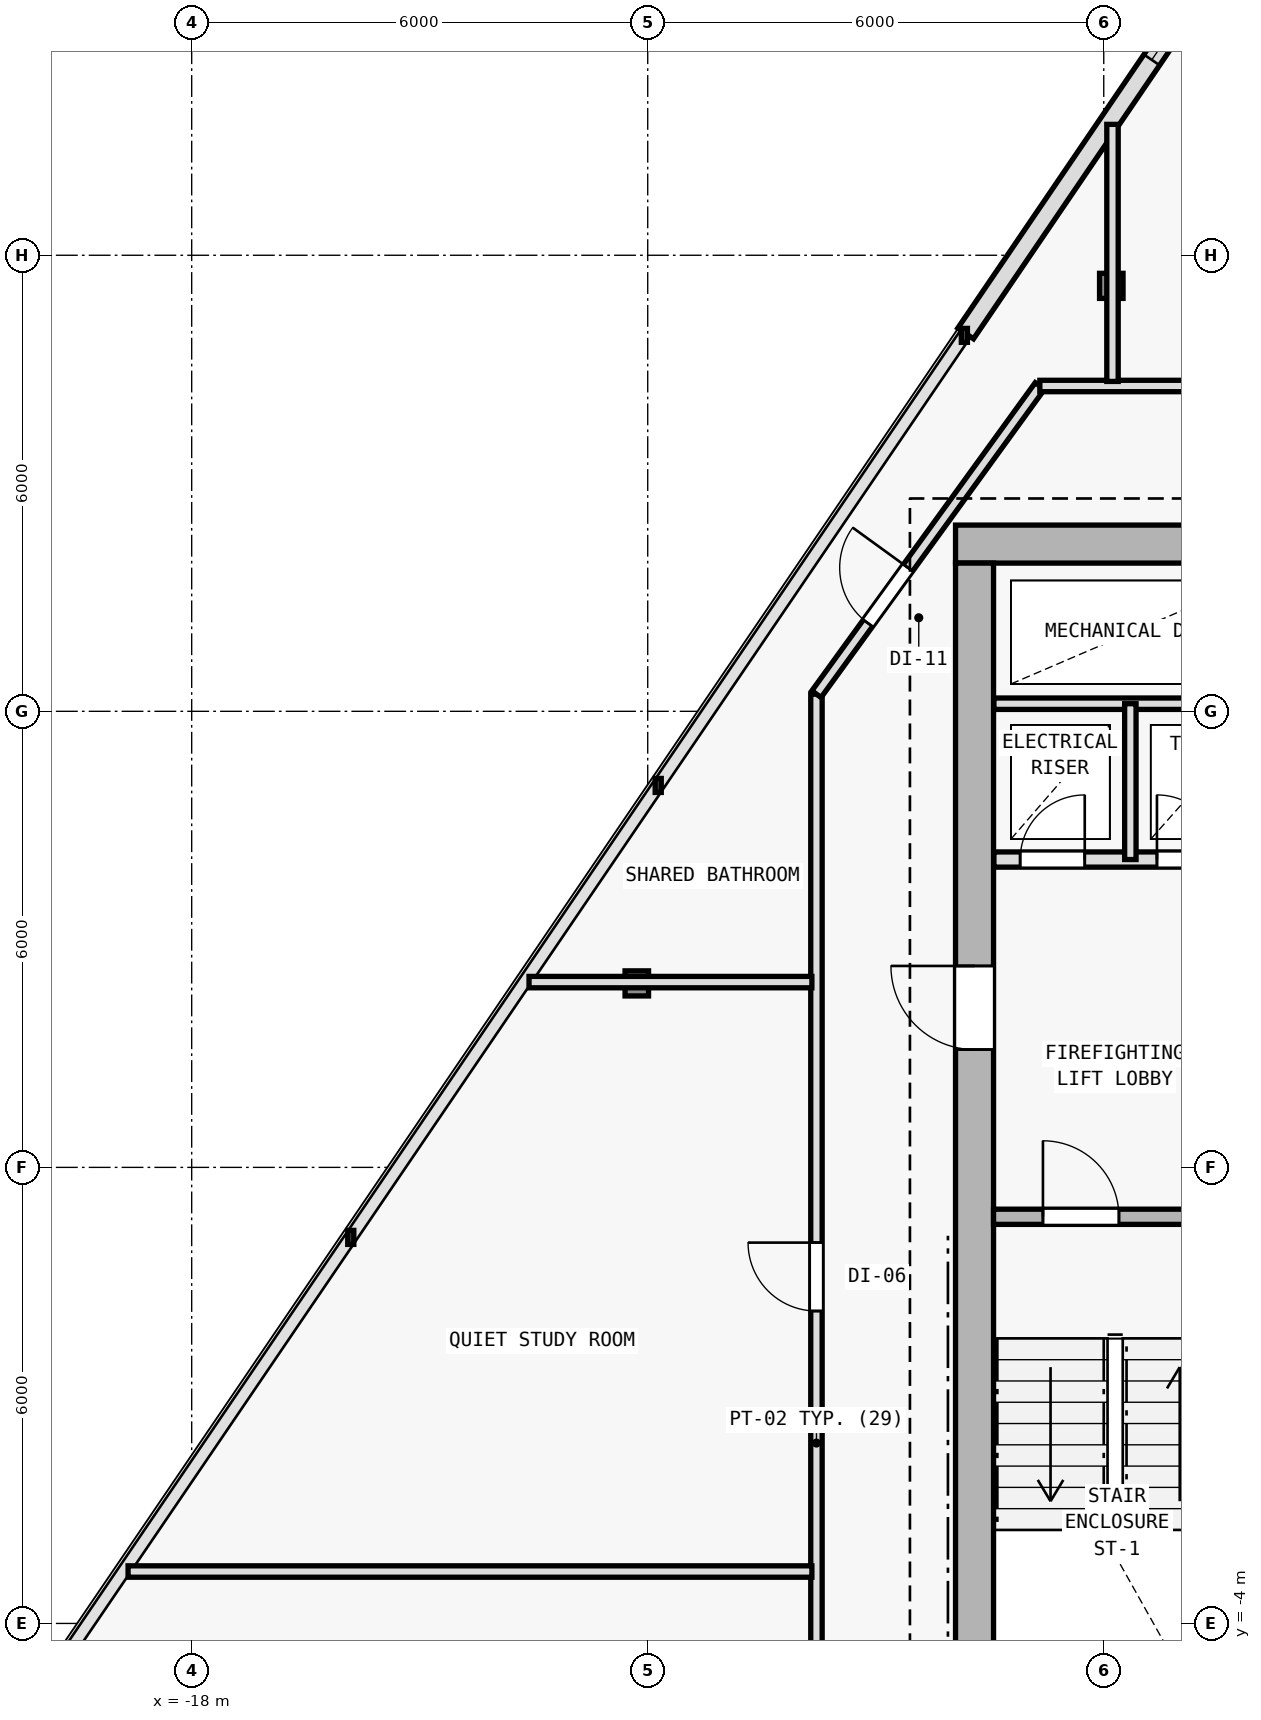
"""IFC4 building model, lengths in metres.
Left out: names, types, materials, properties, quantities, classifications, styles, units other than length and angle.
Written with IfcOpenShell. Run it as: python <this file> out.ifc"""

import sys

from ifc_helpers import new_model, si_unit, direction, frame, frame_2d, origin, origin_2d, place, context, subcontext, project, spatial, rectangle, i_section, extrude, element, fill, save


model = new_model("IFC4")
c1 = context("Model", 3, precision=1e-05, world=origin(), true_north=direction((0.0, 1.0)))
c2 = subcontext(c1, "Body", "Model", "MODEL_VIEW")
j1 = project(units=[si_unit("LENGTHUNIT", "METRE"), si_unit("PLANEANGLEUNIT", "RADIAN")], contexts=[c1])
p1 = place(None, origin())
s1 = spatial("IfcSite", under=j1, at=p1, CompositionType="ELEMENT")
p2 = place(p1, origin())
s2 = spatial("IfcBuilding", under=s1, at=p2, CompositionType="ELEMENT")
p3 = place(p2, frame((0.0, 0.0, 272.4)))
s3 = spatial("IfcBuildingStorey", under=s2, at=p3, CompositionType="ELEMENT", Elevation=272.4)
for number, where, z_axis, x_axis in (
    (1, (-7.7, 10.2, 0.0), (0.0, 0.0, 1.0), (1.0, 0.0, 0.0)),
    (2, (-7.7, 2.0, 0.0), (0.0, 0.0, 1.0), (1.0, 0.0, 0.0)),
):
    element("IfcColumn", number, at=place(p3, frame(where, z_axis=z_axis, x_axis=x_axis)), inside=s3, PredefinedType="COLUMN", context=c2, shape_type="SweptSolid", body=[
        extrude(i_section(OverallWidth=0.374, OverallDepth=0.372, WebThickness=0.012, FlangeThickness=0.02, FilletRadius=0.015, at=origin_2d()), origin(), (0.0, 0.0, 1.0), 3.6),
    ])
p4 = place(p3, frame((-5.901, 13.597, 0.006), z_axis=(0.008775143007, -0.002584925847, 0.999958156636), x_axis=(0.282568886397, 0.959247009086, 0.0)))
e3 = element("IfcColumn", 3, at=p4, inside=s3, PredefinedType="COLUMN", context=c2, shape_type="SweptSolid", body=[
    extrude(i_section(OverallWidth=0.309, OverallDepth=0.33, WebThickness=0.011, FlangeThickness=0.019, FilletRadius=0.027, at=origin_2d()), origin(), (0.0, 0.0, 1.0), 3.589),
])
p5 = place(p3, frame((-12.144, 4.42, 0.006), z_axis=(0.017003572908, 0.009522000828, 0.999810086971), x_axis=(-0.488603368932, 0.87250601595, 0.0)))
e4 = element("IfcColumn", 4, at=p5, inside=s3, PredefinedType="COLUMN", context=c2, shape_type="SweptSolid", body=[
    extrude(i_section(OverallWidth=0.309, OverallDepth=0.33, WebThickness=0.011, FlangeThickness=0.019, FilletRadius=0.027, at=origin_2d()), origin(), (0.0, 0.0, 1.0), 3.59),
])
p6 = place(p3, frame((-7.817, 12.971, 0.0), z_axis=(0.0, 0.0, 1.0), x_axis=(0.562474530687, 0.826814611826, 0.0)))
e5 = element("IfcWall", 5, at=p6, inside=s3, PredefinedType="SOLIDWALL", context=c2, shape_type="SweptSolid", body=[
    extrude(rectangle(XDim=10.107, YDim=0.25, at=frame_2d((5.053, 0.0))), origin(), (0.0, 0.0, 1.0), 3.35),
])
p7 = place(p6, frame((4.354, 0.0, 0.62)))
e6 = element("IfcOpeningElement", 6, at=p7, cuts=e5, PredefinedType="OPENING", context=c2, shape_type="SweptSolid", body=[
    extrude(rectangle(XDim=1.4, YDim=2.0, at=frame_2d((0.7, 1.0))), frame((0.0, 0.135, 0.0), z_axis=(0.0, -1.0, 0.0), x_axis=(1.0, 0.0, 0.0)), (0.0, 0.0, 1.0), 0.27),
])
p8 = place(p3, frame((7.95, 10.2, 0.0), z_axis=(0.0, 0.0, 1.0), x_axis=(-1.0, 0.0, 0.0)))
e7 = element("IfcWall", 7, at=p8, inside=s3, PredefinedType="SHEAR", context=c2, shape_type="SweptSolid", body=[
    extrude(rectangle(XDim=15.9, YDim=0.5, at=frame_2d((7.95, 0.0))), origin(), (0.0, 0.0, 1.0), 3.35),
])
p9 = place(p8, frame((4.4, 0.0, 0.0)))
e8 = element("IfcOpeningElement", 8, at=p9, cuts=e7, PredefinedType="OPENING", context=c2, shape_type="SweptSolid", body=[
    extrude(rectangle(XDim=1.1, YDim=2.15, at=frame_2d((0.55, 1.075))), frame((0.0, 0.26, 0.0), z_axis=(0.0, -1.0, 0.0), x_axis=(1.0, 0.0, 0.0)), (0.0, 0.0, 1.0), 0.52),
])
p10 = place(p3, frame((-7.7, -9.15, 0.0), z_axis=(0.0, 0.0, 1.0), x_axis=(0.0, 1.0, 0.0)))
e9 = element("IfcWall", 9, at=p10, inside=s3, PredefinedType="SHEAR", context=c2, shape_type="SweptSolid", body=[
    extrude(rectangle(XDim=19.1, YDim=0.5, at=frame_2d((9.55, 0.0))), origin(), (0.0, 0.0, 1.0), 3.35),
])
p11 = place(p10, frame((12.7, 0.0, 0.0)))
e10 = element("IfcOpeningElement", 10, at=p11, cuts=e9, PredefinedType="OPENING", context=c2, shape_type="SweptSolid", body=[
    extrude(rectangle(XDim=1.1, YDim=2.15, at=frame_2d((0.55, 1.075))), frame((0.0, 0.26, 0.0), z_axis=(0.0, -1.0, 0.0), x_axis=(1.0, 0.0, 0.0)), (0.0, 0.0, 1.0), 0.52),
])
p12 = place(p3, frame((-7.45, 1.35, 0.0), z_axis=(0.0, 0.0, 1.0), x_axis=(1.0, 0.0, 0.0)))
e11 = element("IfcWall", 11, at=p12, inside=s3, PredefinedType="SOLIDWALL", context=c2, shape_type="SweptSolid", body=[
    extrude(rectangle(XDim=3.4, YDim=0.2, at=frame_2d((1.7, 0.0))), origin(), (0.0, 0.0, 1.0), 3.35),
])
p13 = place(p12, frame((0.65, 0.0, 0.0)))
e12 = element("IfcOpeningElement", 12, at=p13, cuts=e11, PredefinedType="OPENING", context=c2, shape_type="SweptSolid", body=[
    extrude(rectangle(XDim=1.0, YDim=2.15, at=frame_2d((0.5, 1.075))), frame((0.0, 0.11, 0.0), z_axis=(0.0, -1.0, 0.0), x_axis=(1.0, 0.0, 0.0)), (0.0, 0.0, 1.0), 0.22),
])
p14 = place(p3, frame((-7.445, 6.05, 0.0), z_axis=(0.0, 0.0, 1.0), x_axis=(1.0, 0.0, 0.0)))
e13 = element("IfcWall", 13, at=p14, inside=s3, PredefinedType="SOLIDWALL", context=c2, shape_type="SweptSolid", body=[
    extrude(rectangle(XDim=3.595, YDim=0.2, at=frame_2d((1.797, 0.0))), origin(), (0.0, 0.0, 1.0), 3.35),
])
p15 = place(p14, frame((0.345, 0.0, 0.0)))
e14 = element("IfcOpeningElement", 14, at=p15, cuts=e13, PredefinedType="OPENING", context=c2, shape_type="SweptSolid", body=[
    extrude(rectangle(XDim=0.85, YDim=2.1, at=frame_2d((0.425, 1.05))), frame((0.0, 0.11, 0.0), z_axis=(0.0, -1.0, 0.0), x_axis=(1.0, 0.0, 0.0)), (0.0, 0.0, 1.0), 0.22),
])
p16 = place(p14, frame((2.145, 0.0, 0.0)))
e15 = element("IfcOpeningElement", 15, at=p16, cuts=e13, PredefinedType="OPENING", context=c2, shape_type="SweptSolid", body=[
    extrude(rectangle(XDim=0.85, YDim=2.1, at=frame_2d((0.425, 1.05))), frame((0.0, 0.11, 0.0), z_axis=(0.0, -1.0, 0.0), x_axis=(1.0, 0.0, 0.0)), (0.0, 0.0, 1.0), 0.22),
])
p17 = place(p3, frame((-7.445, 8.1, 0.0), z_axis=(0.0, 0.0, 1.0), x_axis=(1.0, 0.0, 0.0)))
e16 = element("IfcWall", 16, at=p17, inside=s3, PredefinedType="PARTITIONING", context=c2, shape_type="SweptSolid", body=[
    extrude(rectangle(XDim=3.595, YDim=0.15, at=frame_2d((1.797, 0.0))), origin(), (0.0, 0.0, 1.0), 3.35),
])
p18 = place(p3, frame((-5.65, 6.05, 0.0), z_axis=(0.0, 0.0, 1.0), x_axis=(0.0, 1.0, 0.0)))
e17 = element("IfcWall", 17, at=p18, inside=s3, PredefinedType="PARTITIONING", context=c2, shape_type="SweptSolid", body=[
    extrude(rectangle(XDim=2.05, YDim=0.15, at=frame_2d((1.025, 0.0))), origin(), (0.0, 0.0, 1.0), 3.35),
])
p19 = place(p3, frame((-9.78, -11.48, 0.0), z_axis=(0.0, 0.0, 1.0), x_axis=(0.0, 1.0, 0.0)))
e18 = element("IfcWall", 18, at=p19, inside=s3, PredefinedType="PARTITIONING", context=c2, shape_type="SweptSolid", body=[
    extrude(rectangle(XDim=19.706, YDim=0.15, at=frame_2d((9.853, 0.0))), origin(), (0.0, 0.0, 1.0), 2.725),
])
p20 = place(p19, frame((11.59, 0.0, 0.0)))
e19 = element("IfcOpeningElement", 19, at=p20, cuts=e18, PredefinedType="OPENING", context=c2, shape_type="SweptSolid", body=[
    extrude(rectangle(XDim=0.9, YDim=2.1, at=frame_2d((0.45, 1.05))), frame((0.0, 0.085, 0.0), z_axis=(0.0, -1.0, 0.0), x_axis=(1.0, 0.0, 0.0)), (0.0, 0.0, 1.0), 0.17),
])
p21 = place(p19, frame((3.721, 0.0, 0.0)))
e20 = element("IfcOpeningElement", 20, at=p21, cuts=e18, PredefinedType="OPENING", context=c2, shape_type="SweptSolid", body=[
    extrude(rectangle(XDim=0.9, YDim=2.1, at=frame_2d((0.45, 1.05))), frame((0.0, 0.085, 0.0), z_axis=(0.0, -1.0, 0.0), x_axis=(1.0, 0.0, 0.0)), (0.0, 0.0, 1.0), 0.17),
])
p22 = place(p3, frame((-9.78, 8.226, 0.0), z_axis=(0.0, 0.0, 1.0), x_axis=(0.586956386413, 0.809618552436, 0.0)))
e21 = element("IfcWall", 21, at=p22, inside=s3, PredefinedType="PARTITIONING", context=c2, shape_type="SweptSolid", body=[
    extrude(rectangle(XDim=5.008, YDim=0.15, at=frame_2d((2.504, 0.0))), origin(), (0.0, 0.0, 1.0), 3.015),
])
p23 = place(p22, frame((1.154, 0.0, 0.0)))
e22 = element("IfcOpeningElement", 22, at=p23, cuts=e21, PredefinedType="OPENING", context=c2, shape_type="SweptSolid", body=[
    extrude(rectangle(XDim=0.9, YDim=2.1, at=frame_2d((0.45, 1.05))), frame((0.0, 0.085, 0.0), z_axis=(0.0, -1.0, 0.0), x_axis=(1.0, 0.0, 0.0)), (0.0, 0.0, 1.0), 0.17),
])
p24 = place(p3, frame((-6.841, 12.28, 0.0), z_axis=(0.0, 0.0, 1.0), x_axis=(1.0, 0.0, 0.0)))
e23 = element("IfcWall", 23, at=p24, inside=s3, PredefinedType="PARTITIONING", context=c2, shape_type="SweptSolid", body=[
    extrude(rectangle(XDim=13.682, YDim=0.15, at=frame_2d((6.841, 0.0))), origin(), (0.0, 0.0, 1.0), 3.015),
])
p25 = place(p24, frame((10.955, 0.0, 0.0)))
e24 = element("IfcOpeningElement", 24, at=p25, cuts=e23, PredefinedType="OPENING", context=c2, shape_type="SweptSolid", body=[
    extrude(rectangle(XDim=0.9, YDim=2.1, at=frame_2d((0.45, 1.05))), frame((0.0, 0.085, 0.0), z_axis=(0.0, -1.0, 0.0), x_axis=(1.0, 0.0, 0.0)), (0.0, 0.0, 1.0), 0.17),
])
p26 = place(p24, frame((4.681, 0.0, 0.0)))
e25 = element("IfcOpeningElement", 25, at=p26, cuts=e23, PredefinedType="OPENING", context=c2, shape_type="SweptSolid", body=[
    extrude(rectangle(XDim=0.9, YDim=2.1, at=frame_2d((0.45, 1.05))), frame((0.0, 0.085, 0.0), z_axis=(0.0, -1.0, 0.0), x_axis=(1.0, 0.0, 0.0)), (0.0, 0.0, 1.0), 0.17),
])
p27 = place(p3, frame((-5.885, 12.34, 0.0), z_axis=(0.0, 0.0, 1.0), x_axis=(0.0, 1.0, 0.0)))
e26 = element("IfcWall", 26, at=p27, inside=s3, PredefinedType="PARTITIONING", context=c2, shape_type="SweptSolid", body=[
    extrude(rectangle(XDim=3.382, YDim=0.15, at=frame_2d((1.691, 0.0))), origin(), (0.0, 0.0, 1.0), 3.015),
])
p28 = place(p3, frame((-9.84, 4.438, 0.0), z_axis=(0.0, 0.0, 1.0), x_axis=(-1.0, 0.0, 0.0)))
e27 = element("IfcWall", 27, at=p28, inside=s3, PredefinedType="PARTITIONING", context=c2, shape_type="SweptSolid", body=[
    extrude(rectangle(XDim=3.721, YDim=0.15, at=frame_2d((1.861, 0.0))), origin(), (0.0, 0.0, 1.0), 3.015),
])
p29 = place(p3, frame((-9.84, -3.317, 0.0), z_axis=(0.0, 0.0, 1.0), x_axis=(-1.0, 0.0, 0.0)))
e28 = element("IfcWall", 28, at=p29, inside=s3, PredefinedType="PARTITIONING", context=c2, shape_type="SweptSolid", body=[
    extrude(rectangle(XDim=8.997, YDim=0.15, at=frame_2d((4.499, 0.0))), origin(), (0.0, 0.0, 1.0), 2.775),
])
p30 = place(p7, origin())
e29 = element("IfcWindow", 29, at=p30, inside=s3, PartitioningType="SINGLE_PANEL", PredefinedType="WINDOW", context=c2, shape_type="SweptSolid", body=[
    extrude(rectangle(XDim=1.4, YDim=2.0, at=frame_2d((0.7, 1.0))), frame((0.0, 0.03, 0.0), z_axis=(0.0, -1.0, 0.0), x_axis=(1.0, 0.0, 0.0)), (0.0, 0.0, 1.0), 0.06),
])
fill(e6, e29)
p31 = place(p11, origin())
e30 = element("IfcDoor", 30, at=p31, inside=s3, OperationType="SINGLE_SWING_RIGHT", PredefinedType="DOOR", context=c2, shape_type="SweptSolid", body=[
    extrude(rectangle(XDim=1.1, YDim=2.15, at=frame_2d((0.55, 1.075))), frame((0.0, 0.025, 0.0), z_axis=(0.0, -1.0, 0.0), x_axis=(1.0, 0.0, 0.0)), (0.0, 0.0, 1.0), 0.05),
])
fill(e10, e30)
p32 = place(p13, origin())
e31 = element("IfcDoor", 31, at=p32, inside=s3, OperationType="SINGLE_SWING_LEFT", PredefinedType="DOOR", context=c2, shape_type="SweptSolid", body=[
    extrude(rectangle(XDim=1.0, YDim=2.15, at=frame_2d((0.5, 1.075))), frame((0.0, 0.025, 0.0), z_axis=(0.0, -1.0, 0.0), x_axis=(1.0, 0.0, 0.0)), (0.0, 0.0, 1.0), 0.05),
])
fill(e12, e31)
p33 = place(p15, origin())
e32 = element("IfcDoor", 32, at=p33, inside=s3, OperationType="SINGLE_SWING_RIGHT", PredefinedType="DOOR", context=c2, shape_type="SweptSolid", body=[
    extrude(rectangle(XDim=0.85, YDim=2.1, at=frame_2d((0.425, 1.05))), frame((0.0, 0.025, 0.0), z_axis=(0.0, -1.0, 0.0), x_axis=(1.0, 0.0, 0.0)), (0.0, 0.0, 1.0), 0.05),
])
fill(e14, e32)
p34 = place(p16, origin())
e33 = element("IfcDoor", 33, at=p34, inside=s3, OperationType="SINGLE_SWING_LEFT", PredefinedType="DOOR", context=c2, shape_type="SweptSolid", body=[
    extrude(rectangle(XDim=0.85, YDim=2.1, at=frame_2d((0.425, 1.05))), frame((0.0, 0.025, 0.0), z_axis=(0.0, -1.0, 0.0), x_axis=(1.0, 0.0, 0.0)), (0.0, 0.0, 1.0), 0.05),
])
fill(e15, e33)
p35 = place(p20, origin())
e34 = element("IfcDoor", 34, at=p35, inside=s3, OperationType="SINGLE_SWING_RIGHT", PredefinedType="DOOR", context=c2, shape_type="SweptSolid", body=[
    extrude(rectangle(XDim=0.9, YDim=2.1, at=frame_2d((0.45, 1.05))), frame((0.0, 0.025, 0.0), z_axis=(0.0, -1.0, 0.0), x_axis=(1.0, 0.0, 0.0)), (0.0, 0.0, 1.0), 0.05),
])
fill(e19, e34)
p36 = place(p23, origin())
e35 = element("IfcDoor", 35, at=p36, inside=s3, OperationType="SINGLE_SWING_RIGHT", PredefinedType="DOOR", context=c2, shape_type="SweptSolid", body=[
    extrude(rectangle(XDim=0.9, YDim=2.1, at=frame_2d((0.45, 1.05))), frame((0.0, 0.025, 0.0), z_axis=(0.0, -1.0, 0.0), x_axis=(1.0, 0.0, 0.0)), (0.0, 0.0, 1.0), 0.05),
])
fill(e22, e35)
save(model, sys.argv[1])
